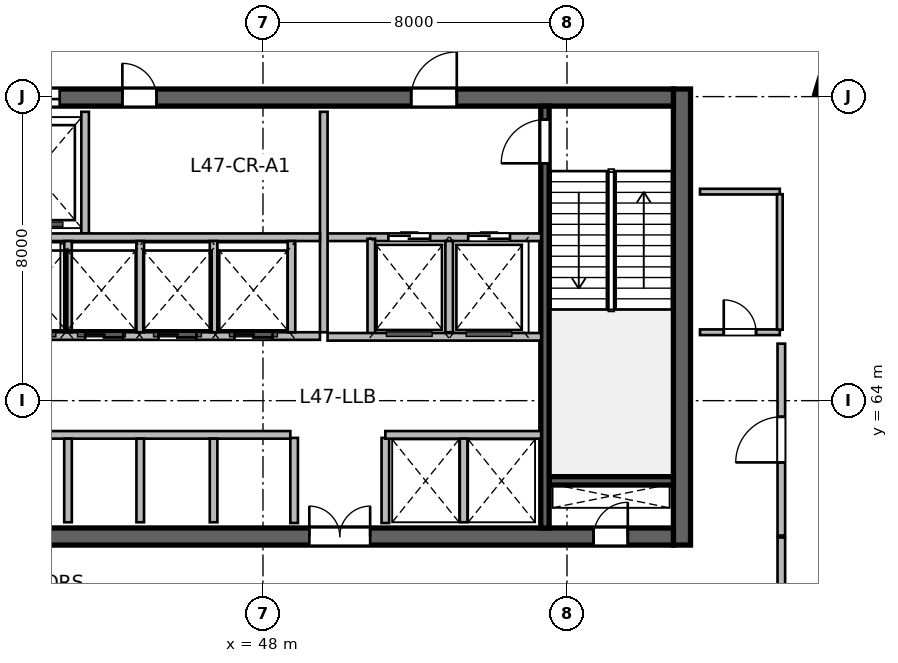
"""IFC4 building model, lengths in metres.
Left out: names, types, materials, properties, quantities, classifications, styles, units other than length and angle.
Written with IfcOpenShell. Run it as: python <this file> out.ifc"""

import sys

from ifc_helpers import new_model, si_unit, direction, frame, frame_2d, origin, origin_2d, place, context, subcontext, project, spatial, rectangle, extrude, source, transform, mapped, element, fill, save


model = new_model("IFC4")
c1 = context("Model", 3, precision=1e-05, world=origin(), true_north=direction((0.0, 1.0)))
c2 = subcontext(c1, "Body", "Model", "MODEL_VIEW")
j1 = project(units=[si_unit("LENGTHUNIT", "METRE"), si_unit("PLANEANGLEUNIT", "RADIAN")], contexts=[c1])
p1 = place(None, origin())
s1 = spatial("IfcSite", under=j1, at=p1, CompositionType="ELEMENT")
p2 = place(p1, origin())
s2 = spatial("IfcBuilding", under=s1, at=p2, CompositionType="ELEMENT")
p3 = place(p2, frame((0.0, 0.0, 194.4)))
s3 = spatial("IfcBuildingStorey", under=s2, at=p3, CompositionType="ELEMENT", Elevation=194.4)
m1 = source(origin(), c2, "Body", "SweptSolid", [
    extrude(rectangle(XDim=12.0, YDim=0.45, at=frame_2d((6.0, 0.0))), origin(), (0.0, 0.0, 1.0), 4.8),
])
p4 = place(p3, frame((59.025, 60.2, 0.0), z_axis=(0.0, 0.0, 1.0), x_axis=(0.0, 1.0, 0.0)))
e1 = element("IfcWall", 1, at=p4, inside=s3, PredefinedType="SHEAR", context=c2, shape_type="MappedRepresentation", body=[
    mapped(m1, transform((0.0, 0.0, 0.0), scale=1.0)),
])
m2 = source(origin(), c2, "Body", "SweptSolid", [
    extrude(rectangle(XDim=21.6, YDim=0.45, at=frame_2d((10.8, 0.0))), origin(), (0.0, 0.0, 1.0), 4.8),
])
p5 = place(p3, frame((37.2, 60.425, 0.0), z_axis=(0.0, 0.0, 1.0), x_axis=(1.0, 0.0, 0.0)))
e2 = element("IfcWall", 2, at=p5, inside=s3, PredefinedType="SHEAR", context=c2, shape_type="MappedRepresentation", body=[
    mapped(m2, transform((0.0, 0.0, 0.0), scale=1.0)),
])
p6 = place(p5, frame((1.1, 0.0, 0.0)))
e3 = element("IfcOpeningElement", 3, at=p6, cuts=e2, PredefinedType="OPENING", context=c2, shape_type="SweptSolid", body=[
    extrude(rectangle(XDim=1.15, YDim=2.15, at=frame_2d((0.575, 1.075))), frame((0.0, 0.235, 0.0), z_axis=(0.0, -1.0, 0.0), x_axis=(1.0, 0.0, 0.0)), (0.0, 0.0, 1.0), 0.47),
])
p7 = place(p5, frame((19.5, 0.0, 0.0)))
e4 = element("IfcOpeningElement", 4, at=p7, cuts=e2, PredefinedType="OPENING", context=c2, shape_type="SweptSolid", body=[
    extrude(rectangle(XDim=0.9, YDim=2.1, at=frame_2d((0.45, 1.05))), frame((0.0, 0.235, 0.0), z_axis=(0.0, -1.0, 0.0), x_axis=(1.0, 0.0, 0.0)), (0.0, 0.0, 1.0), 0.47),
])
p8 = place(p5, frame((12.02, 0.0, 0.0)))
e5 = element("IfcOpeningElement", 5, at=p8, cuts=e2, PredefinedType="OPENING", context=c2, shape_type="SweptSolid", body=[
    extrude(rectangle(XDim=1.6, YDim=2.15, at=frame_2d((0.8, 1.075))), frame((0.0, 0.235, 0.0), z_axis=(0.0, -1.0, 0.0), x_axis=(1.0, 0.0, 0.0)), (0.0, 0.0, 1.0), 0.47),
])
p9 = place(p3, frame((37.2, 71.975, 0.0), z_axis=(0.0, 0.0, 1.0), x_axis=(1.0, 0.0, 0.0)))
e6 = element("IfcWall", 6, at=p9, inside=s3, PredefinedType="SHEAR", context=c2, shape_type="MappedRepresentation", body=[
    mapped(m2, transform((0.0, 0.0, 0.0), scale=1.0)),
])
p10 = place(p9, frame((1.2, 0.0, 0.0)))
e7 = element("IfcOpeningElement", 7, at=p10, cuts=e6, PredefinedType="OPENING", context=c2, shape_type="SweptSolid", body=[
    extrude(rectangle(XDim=0.9, YDim=2.1, at=frame_2d((0.45, 1.05))), frame((0.0, 0.235, 0.0), z_axis=(0.0, -1.0, 0.0), x_axis=(1.0, 0.0, 0.0)), (0.0, 0.0, 1.0), 0.47),
])
p11 = place(p9, frame((14.7, 0.0, 0.0)))
e8 = element("IfcOpeningElement", 8, at=p11, cuts=e6, PredefinedType="OPENING", context=c2, shape_type="SweptSolid", body=[
    extrude(rectangle(XDim=1.2, YDim=2.15, at=frame_2d((0.6, 1.075))), frame((0.0, 0.235, 0.0), z_axis=(0.0, -1.0, 0.0), x_axis=(1.0, 0.0, 0.0)), (0.0, 0.0, 1.0), 0.47),
])
p12 = place(p9, frame((4.15, 0.0, 0.0)))
e9 = element("IfcOpeningElement", 9, at=p12, cuts=e6, PredefinedType="OPENING", context=c2, shape_type="SweptSolid", body=[
    extrude(rectangle(XDim=1.3, YDim=2.15, at=frame_2d((0.65, 1.075))), frame((0.0, 0.235, 0.0), z_axis=(0.0, -1.0, 0.0), x_axis=(1.0, 0.0, 0.0)), (0.0, 0.0, 1.0), 0.47),
])
p13 = place(p9, frame((7.1, 0.0, 0.0)))
e10 = element("IfcOpeningElement", 10, at=p13, cuts=e6, PredefinedType="OPENING", context=c2, shape_type="SweptSolid", body=[
    extrude(rectangle(XDim=0.9, YDim=2.1, at=frame_2d((0.45, 1.05))), frame((0.0, 0.235, 0.0), z_axis=(0.0, -1.0, 0.0), x_axis=(1.0, 0.0, 0.0)), (0.0, 0.0, 1.0), 0.47),
])
m3 = source(origin(), c2, "Body", "SweptSolid", [
    extrude(rectangle(XDim=3.27, YDim=0.22, at=frame_2d((1.635, 0.0))), origin(), (0.0, 0.0, 1.0), 4.8),
])
p14 = place(p3, frame((55.53, 61.89, 0.0), z_axis=(0.0, 0.0, 1.0), x_axis=(1.0, 0.0, 0.0)))
e11 = element("IfcWall", 11, at=p14, inside=s3, PredefinedType="SHEAR", context=c2, shape_type="MappedRepresentation", body=[
    mapped(m3, transform((0.0, 0.0, 0.0), scale=1.0)),
])
m4 = source(origin(), c2, "Body", "SweptSolid", [
    extrude(rectangle(XDim=11.1, YDim=0.22, at=frame_2d((5.55, 0.0))), origin(), (0.0, 0.0, 1.0), 4.8),
])
p15 = place(p3, frame((55.42, 60.65, 0.0), z_axis=(0.0, 0.0, 1.0), x_axis=(0.0, 1.0, 0.0)))
e12 = element("IfcWall", 12, at=p15, inside=s3, PredefinedType="SHEAR", context=c2, shape_type="MappedRepresentation", body=[
    mapped(m4, transform((0.0, 0.0, 0.0), scale=1.0)),
])
p16 = place(p15, frame((9.595, 0.0, 0.0)))
e13 = element("IfcOpeningElement", 13, at=p16, cuts=e12, PredefinedType="OPENING", context=c2, shape_type="SweptSolid", body=[
    extrude(rectangle(XDim=1.15, YDim=2.15, at=frame_2d((0.575, 1.075))), frame((0.0, 0.12, 0.0), z_axis=(0.0, -1.0, 0.0), x_axis=(1.0, 0.0, 0.0)), (0.0, 0.0, 1.0), 0.24),
])
m5 = source(origin(), c2, "Body", "SweptSolid", [
    extrude(rectangle(XDim=1.1, YDim=1.1, at=origin_2d()), origin(), (0.0, 0.0, 1.0), 4.8),
])
p17 = place(p3, frame((63.209, 72.442, 0.0), z_axis=(0.0, 0.0, 1.0), x_axis=(0.288697611798, 0.957420330337, 0.0)))
e14 = element("IfcColumn", 14, at=p17, inside=s3, PredefinedType="COLUMN", context=c2, shape_type="MappedRepresentation", body=[
    mapped(m5, transform((0.0, 0.0, 0.0), scale=1.0)),
])
m6 = source(origin(), c2, "Body", "SweptSolid", [
    extrude(rectangle(XDim=2.24, YDim=0.2, at=frame_2d((1.12, 0.0))), origin(), (0.0, 0.0, 1.0), 4.54),
])
for number, where, z_axis, x_axis in (
    (15, (48.82, 60.78, 0.0), (0.0, 0.0, 1.0), (0.0, 1.0, 0.0)),
    (16, (51.22, 60.78, 0.0), (0.0, 0.0, 1.0), (0.0, 1.0, 0.0)),
):
    element("IfcWall", number, at=place(p3, frame(where, z_axis=z_axis, x_axis=x_axis)), inside=s3, PredefinedType="SOLIDWALL", context=c2, shape_type="MappedRepresentation", body=[
        mapped(m6, transform((0.0, 0.0, 0.0), scale=1.0)),
    ])
m7 = source(origin(), c2, "Body", "SweptSolid", [
    extrude(rectangle(XDim=5.62, YDim=0.2, at=frame_2d((2.81, 0.0))), origin(), (0.0, 0.0, 1.0), 4.54),
])
p18 = place(p3, frame((49.7, 68.3, 0.0), z_axis=(0.0, 0.0, 1.0), x_axis=(1.0, 0.0, 0.0)))
e17 = element("IfcWall", 17, at=p18, inside=s3, PredefinedType="SOLIDWALL", context=c2, shape_type="MappedRepresentation", body=[
    mapped(m7, transform((0.0, 0.0, 0.0), scale=1.0)),
])
p19 = place(p18, frame((1.6, 0.0, 0.0)))
e18 = element("IfcOpeningElement", 18, at=p19, cuts=e17, PredefinedType="OPENING", context=c2, shape_type="SweptSolid", body=[
    extrude(rectangle(XDim=1.1, YDim=2.15, at=frame_2d((0.55, 1.075))), frame((0.0, 0.11, 0.0), z_axis=(0.0, -1.0, 0.0), x_axis=(1.0, 0.0, 0.0)), (0.0, 0.0, 1.0), 0.22),
])
p20 = place(p18, frame((3.7, 0.0, 0.0)))
e19 = element("IfcOpeningElement", 19, at=p20, cuts=e17, PredefinedType="OPENING", context=c2, shape_type="SweptSolid", body=[
    extrude(rectangle(XDim=1.1, YDim=2.15, at=frame_2d((0.55, 1.075))), frame((0.0, 0.11, 0.0), z_axis=(0.0, -1.0, 0.0), x_axis=(1.0, 0.0, 0.0)), (0.0, 0.0, 1.0), 0.22),
])
m8 = source(origin(), c2, "Body", "SweptSolid", [
    extrude(rectangle(XDim=5.8, YDim=0.2, at=frame_2d((2.9, 0.0))), origin(), (0.0, 0.0, 1.0), 4.54),
])
p21 = place(p3, frame((49.6, 65.8, 0.0), z_axis=(0.0, 0.0, 1.0), x_axis=(0.0, 1.0, 0.0)))
e20 = element("IfcWall", 20, at=p21, inside=s3, PredefinedType="SOLIDWALL", context=c2, shape_type="MappedRepresentation", body=[
    mapped(m8, transform((0.0, 0.0, 0.0), scale=1.0)),
])
m9 = source(origin(), c2, "Body", "SweptSolid", [
    extrude(rectangle(XDim=2.58, YDim=0.2, at=frame_2d((1.29, 0.0))), origin(), (0.0, 0.0, 1.0), 4.54),
])
p22 = place(p3, frame((50.85, 65.68, 0.0), z_axis=(0.0, 0.0, 1.0), x_axis=(0.0, 1.0, 0.0)))
e21 = element("IfcWall", 21, at=p22, inside=s3, PredefinedType="SOLIDWALL", context=c2, shape_type="MappedRepresentation", body=[
    mapped(m9, transform((0.0, 0.0, 0.0), scale=1.0)),
])
m10 = source(origin(), c2, "Body", "SweptSolid", [
    extrude(rectangle(XDim=2.4, YDim=0.2, at=frame_2d((1.2, 0.0))), origin(), (0.0, 0.0, 1.0), 4.54),
])
p23 = place(p3, frame((52.9, 65.8, 0.0), z_axis=(0.0, 0.0, 1.0), x_axis=(0.0, 1.0, 0.0)))
e22 = element("IfcWall", 22, at=p23, inside=s3, PredefinedType="SOLIDWALL", context=c2, shape_type="MappedRepresentation", body=[
    mapped(m10, transform((0.0, 0.0, 0.0), scale=1.0)),
])
p24 = place(p3, frame((49.7, 65.68, 0.0), z_axis=(0.0, 0.0, 1.0), x_axis=(1.0, 0.0, 0.0)))
e23 = element("IfcWall", 23, at=p24, inside=s3, PredefinedType="SOLIDWALL", context=c2, shape_type="MappedRepresentation", body=[
    mapped(m7, transform((0.0, 0.0, 0.0), scale=1.0)),
])
m11 = source(origin(), c2, "Body", "SweptSolid", [
    extrude(rectangle(XDim=3.2, YDim=0.2, at=frame_2d((1.6, 0.0))), origin(), (0.0, 0.0, 1.0), 4.54),
])
p25 = place(p3, frame((43.32, 68.4, 0.0), z_axis=(0.0, 0.0, 1.0), x_axis=(0.0, 1.0, 0.0)))
e24 = element("IfcWall", 24, at=p25, inside=s3, PredefinedType="SOLIDWALL", context=c2, shape_type="MappedRepresentation", body=[
    mapped(m11, transform((0.0, 0.0, 0.0), scale=1.0)),
])
m12 = source(origin(), c2, "Body", "SweptSolid", [
    extrude(rectangle(XDim=8.8, YDim=0.2, at=frame_2d((4.4, 0.0))), origin(), (0.0, 0.0, 1.0), 4.54),
])
p26 = place(p3, frame((40.7, 68.3, 0.0), z_axis=(0.0, 0.0, 1.0), x_axis=(1.0, 0.0, 0.0)))
e25 = element("IfcWall", 25, at=p26, inside=s3, PredefinedType="SOLIDWALL", context=c2, shape_type="MappedRepresentation", body=[
    mapped(m12, transform((0.0, 0.0, 0.0), scale=1.0)),
])
m13 = source(origin(), c2, "Body", "SweptSolid", [
    extrude(rectangle(XDim=8.02, YDim=0.2, at=frame_2d((4.01, 0.0))), origin(), (0.0, 0.0, 1.0), 4.54),
])
p27 = place(p3, frame((40.7, 63.1, 0.0), z_axis=(0.0, 0.0, 1.0), x_axis=(1.0, 0.0, 0.0)))
e26 = element("IfcWall", 26, at=p27, inside=s3, PredefinedType="SOLIDWALL", context=c2, shape_type="MappedRepresentation", body=[
    mapped(m13, transform((0.0, 0.0, 0.0), scale=1.0)),
])
m14 = source(origin(), c2, "Body", "SweptSolid", [
    extrude(rectangle(XDim=4.1, YDim=0.2, at=frame_2d((2.05, 0.0))), origin(), (0.0, 0.0, 1.0), 4.54),
])
p28 = place(p3, frame((51.22, 63.1, 0.0), z_axis=(0.0, 0.0, 1.0), x_axis=(1.0, 0.0, 0.0)))
e27 = element("IfcWall", 27, at=p28, inside=s3, PredefinedType="SOLIDWALL", context=c2, shape_type="MappedRepresentation", body=[
    mapped(m14, transform((0.0, 0.0, 0.0), scale=1.0)),
])
m15 = source(origin(), c2, "Body", "SweptSolid", [
    extrude(rectangle(XDim=2.2, YDim=0.2, at=frame_2d((1.1, 0.0))), origin(), (0.0, 0.0, 1.0), 4.54),
])
for number, where, z_axis, x_axis in (
    (28, (42.87, 60.8, 0.0), (0.0, 0.0, 1.0), (0.0, 1.0, 0.0)),
    (29, (44.77, 60.8, 0.0), (0.0, 0.0, 1.0), (0.0, 1.0, 0.0)),
    (30, (46.7, 60.8, 0.0), (0.0, 0.0, 1.0), (0.0, 1.0, 0.0)),
    (31, (53.28, 60.8, 0.0), (0.0, 0.0, 1.0), (0.0, 1.0, 0.0)),
):
    element("IfcWall", number, at=place(p3, frame(where, z_axis=z_axis, x_axis=x_axis)), inside=s3, PredefinedType="SOLIDWALL", context=c2, shape_type="MappedRepresentation", body=[
        mapped(m15, transform((0.0, 0.0, 0.0), scale=1.0)),
    ])
p29 = place(p3, frame((40.7, 65.7, 0.0), z_axis=(0.0, 0.0, 1.0), x_axis=(1.0, 0.0, 0.0)))
e32 = element("IfcWall", 32, at=p29, inside=s3, PredefinedType="SOLIDWALL", context=c2, shape_type="MappedRepresentation", body=[
    mapped(m12, transform((0.0, 0.0, 0.0), scale=1.0)),
])
p30 = place(p29, frame((0.72, 0.0, 0.0)))
e33 = element("IfcOpeningElement", 33, at=p30, cuts=e32, PredefinedType="OPENING", context=c2, shape_type="SweptSolid", body=[
    extrude(rectangle(XDim=1.0, YDim=2.15, at=frame_2d((0.5, 1.075))), frame((0.0, 0.11, 0.0), z_axis=(0.0, -1.0, 0.0), x_axis=(1.0, 0.0, 0.0)), (0.0, 0.0, 1.0), 0.22),
])
p31 = place(p29, frame((2.62, 0.0, 0.0)))
e34 = element("IfcOpeningElement", 34, at=p31, cuts=e32, PredefinedType="OPENING", context=c2, shape_type="SweptSolid", body=[
    extrude(rectangle(XDim=1.0, YDim=2.15, at=frame_2d((0.5, 1.075))), frame((0.0, 0.11, 0.0), z_axis=(0.0, -1.0, 0.0), x_axis=(1.0, 0.0, 0.0)), (0.0, 0.0, 1.0), 0.22),
])
p32 = place(p29, frame((4.55, 0.0, 0.0)))
e35 = element("IfcOpeningElement", 35, at=p32, cuts=e32, PredefinedType="OPENING", context=c2, shape_type="SweptSolid", body=[
    extrude(rectangle(XDim=1.0, YDim=2.15, at=frame_2d((0.5, 1.075))), frame((0.0, 0.11, 0.0), z_axis=(0.0, -1.0, 0.0), x_axis=(1.0, 0.0, 0.0)), (0.0, 0.0, 1.0), 0.22),
])
p33 = place(p29, frame((6.55, 0.0, 0.0)))
e36 = element("IfcOpeningElement", 36, at=p33, cuts=e32, PredefinedType="OPENING", context=c2, shape_type="SweptSolid", body=[
    extrude(rectangle(XDim=1.0, YDim=2.15, at=frame_2d((0.5, 1.075))), frame((0.0, 0.11, 0.0), z_axis=(0.0, -1.0, 0.0), x_axis=(1.0, 0.0, 0.0)), (0.0, 0.0, 1.0), 0.22),
])
for number, where, z_axis, x_axis in (
    (37, (48.75, 65.8, 0.0), (0.0, 0.0, 1.0), (0.0, 1.0, 0.0)),
    (38, (42.87, 65.8, 0.0), (0.0, 0.0, 1.0), (0.0, 1.0, 0.0)),
    (39, (44.77, 65.8, 0.0), (0.0, 0.0, 1.0), (0.0, 1.0, 0.0)),
    (40, (46.7, 65.8, 0.0), (0.0, 0.0, 1.0), (0.0, 1.0, 0.0)),
):
    element("IfcWall", number, at=place(p3, frame(where, z_axis=z_axis, x_axis=x_axis)), inside=s3, PredefinedType="SOLIDWALL", context=c2, shape_type="MappedRepresentation", body=[
        mapped(m10, transform((0.0, 0.0, 0.0), scale=1.0)),
    ])
m16 = source(origin(), c2, "Body", "SweptSolid", [
    extrude(rectangle(XDim=2.1, YDim=0.15, at=frame_2d((1.05, 0.0))), origin(), (0.0, 0.0, 1.0), 4.54),
])
p34 = place(p3, frame((59.5, 65.8, 0.0), z_axis=(0.0, 0.0, 1.0), x_axis=(1.0, 0.0, 0.0)))
e41 = element("IfcWall", 41, at=p34, inside=s3, PredefinedType="PARTITIONING", context=c2, shape_type="MappedRepresentation", body=[
    mapped(m16, transform((0.0, 0.0, 0.0), scale=1.0)),
])
p35 = place(p34, frame((0.625, 0.0, 0.0)))
e42 = element("IfcOpeningElement", 42, at=p35, cuts=e41, PredefinedType="OPENING", context=c2, shape_type="SweptSolid", body=[
    extrude(rectangle(XDim=0.85, YDim=2.1, at=frame_2d((0.425, 1.05))), frame((0.0, 0.085, 0.0), z_axis=(0.0, -1.0, 0.0), x_axis=(1.0, 0.0, 0.0)), (0.0, 0.0, 1.0), 0.17),
])
p36 = place(p3, frame((59.5, 69.5, 0.0), z_axis=(0.0, 0.0, 1.0), x_axis=(1.0, 0.0, 0.0)))
e43 = element("IfcWall", 43, at=p36, inside=s3, PredefinedType="PARTITIONING", context=c2, shape_type="MappedRepresentation", body=[
    mapped(m16, transform((0.0, 0.0, 0.0), scale=1.0)),
])
m17 = source(origin(), c2, "Body", "SweptSolid", [
    extrude(rectangle(XDim=3.565, YDim=0.15, at=frame_2d((1.783, 0.0))), origin(), (0.0, 0.0, 1.0), 4.54),
])
p37 = place(p3, frame((61.6, 65.867, 0.0), z_axis=(0.0, 0.0, 1.0), x_axis=(0.0, 1.0, 0.0)))
e44 = element("IfcWall", 44, at=p37, inside=s3, PredefinedType="PARTITIONING", context=c2, shape_type="MappedRepresentation", body=[
    mapped(m17, transform((0.0, 0.0, 0.0), scale=1.0)),
])
m18 = source(origin(), c2, "Body", "SweptSolid", [
    extrude(rectangle(XDim=12.336, YDim=0.2, at=frame_2d((6.168, 0.0))), origin(), (0.0, 0.0, 1.0), 3.898),
])
p38 = place(p3, frame((61.64, 48.064, 0.0), z_axis=(0.0, 0.0, 1.0), x_axis=(0.0, 1.0, 0.0)))
e45 = element("IfcWall", 45, at=p38, inside=s3, PredefinedType="SOLIDWALL", context=c2, shape_type="MappedRepresentation", body=[
    mapped(m18, transform((0.0, 0.0, 0.0), scale=1.0)),
])
m19 = source(origin(), c2, "Body", "SweptSolid", [
    extrude(rectangle(XDim=5.05, YDim=0.2, at=frame_2d((2.525, 0.0))), origin(), (0.0, 0.0, 1.0), 4.54),
])
p39 = place(p3, frame((61.64, 60.45, 0.0), z_axis=(0.0, 0.0, 1.0), x_axis=(0.0, 1.0, 0.0)))
e46 = element("IfcWall", 46, at=p39, inside=s3, PredefinedType="SOLIDWALL", context=c2, shape_type="MappedRepresentation", body=[
    mapped(m19, transform((0.0, 0.0, 0.0), scale=1.0)),
])
p40 = place(p39, frame((1.925, 0.0, 0.0)))
e47 = element("IfcOpeningElement", 47, at=p40, cuts=e46, PredefinedType="OPENING", context=c2, shape_type="SweptSolid", body=[
    extrude(rectangle(XDim=1.2, YDim=2.15, at=frame_2d((0.6, 1.075))), frame((0.0, 0.11, 0.0), z_axis=(0.0, -1.0, 0.0), x_axis=(1.0, 0.0, 0.0)), (0.0, 0.0, 1.0), 0.22),
])
m20 = source(origin(), c2, "Body", "SweptSolid", [
    extrude(rectangle(XDim=0.9, YDim=2.1, at=frame_2d((0.45, 1.05))), frame((0.0, 0.025, 0.0), z_axis=(0.0, -1.0, 0.0), x_axis=(1.0, 0.0, 0.0)), (0.0, 0.0, 1.0), 0.05),
])
p41 = place(p7, origin())
e48 = element("IfcDoor", 48, at=p41, inside=s3, OperationType="SINGLE_SWING_RIGHT", PredefinedType="DOOR", context=c2, shape_type="MappedRepresentation", body=[
    mapped(m20, transform((0.0, 0.0, 0.0), scale=1.0)),
])
fill(e4, e48)
m21 = source(origin(), c2, "Body", "SweptSolid", [
    extrude(rectangle(XDim=1.15, YDim=2.15, at=frame_2d((0.575, 1.075))), frame((0.0, 0.025, 0.0), z_axis=(0.0, -1.0, 0.0), x_axis=(1.0, 0.0, 0.0)), (0.0, 0.0, 1.0), 0.05),
])
p42 = place(p16, origin())
e49 = element("IfcDoor", 49, at=p42, inside=s3, OperationType="SINGLE_SWING_LEFT", PredefinedType="DOOR", context=c2, shape_type="MappedRepresentation", body=[
    mapped(m21, transform((0.0, 0.0, 0.0), scale=1.0)),
])
fill(e13, e49)
m22 = source(origin(), c2, "Body", "SweptSolid", [
    extrude(rectangle(XDim=1.6, YDim=2.15, at=frame_2d((0.8, 1.075))), frame((0.0, 0.025, 0.0), z_axis=(0.0, -1.0, 0.0), x_axis=(1.0, 0.0, 0.0)), (0.0, 0.0, 1.0), 0.05),
])
p43 = place(p8, origin())
e50 = element("IfcDoor", 50, at=p43, inside=s3, OperationType="DOUBLE_DOOR_SINGLE_SWING", PredefinedType="DOOR", context=c2, shape_type="MappedRepresentation", body=[
    mapped(m22, transform((0.0, 0.0, 0.0), scale=1.0)),
])
fill(e5, e50)
m23 = source(origin(), c2, "Body", "SweptSolid", [
    extrude(rectangle(XDim=1.2, YDim=2.15, at=frame_2d((0.6, 1.075))), frame((0.0, 0.025, 0.0), z_axis=(0.0, -1.0, 0.0), x_axis=(1.0, 0.0, 0.0)), (0.0, 0.0, 1.0), 0.05),
])
p44 = place(p11, origin())
e51 = element("IfcDoor", 51, at=p44, inside=s3, OperationType="SINGLE_SWING_RIGHT", PredefinedType="DOOR", context=c2, shape_type="MappedRepresentation", body=[
    mapped(m23, transform((0.0, 0.0, 0.0), scale=1.0)),
])
fill(e8, e51)
m24 = source(origin(), c2, "Body", "SweptSolid", [
    extrude(rectangle(XDim=1.1, YDim=2.15, at=frame_2d((0.55, 1.075))), frame((0.0, 0.025, 0.0), z_axis=(0.0, -1.0, 0.0), x_axis=(1.0, 0.0, 0.0)), (0.0, 0.0, 1.0), 0.05),
])
p45 = place(p19, origin())
e52 = element("IfcDoor", 52, at=p45, inside=s3, OperationType="DOUBLE_DOOR_SLIDING", PredefinedType="DOOR", context=c2, shape_type="MappedRepresentation", body=[
    mapped(m24, transform((0.0, 0.0, 0.0), scale=1.0)),
])
fill(e18, e52)
p46 = place(p20, origin())
e53 = element("IfcDoor", 53, at=p46, inside=s3, OperationType="DOUBLE_DOOR_SLIDING", PredefinedType="DOOR", context=c2, shape_type="MappedRepresentation", body=[
    mapped(m24, transform((0.0, 0.0, 0.0), scale=1.0)),
])
fill(e19, e53)
m25 = source(origin(), c2, "Body", "SweptSolid", [
    extrude(rectangle(XDim=1.3, YDim=2.15, at=frame_2d((0.65, 1.075))), frame((0.0, 0.025, 0.0), z_axis=(0.0, -1.0, 0.0), x_axis=(1.0, 0.0, 0.0)), (0.0, 0.0, 1.0), 0.05),
])
p47 = place(p12, origin())
e54 = element("IfcDoor", 54, at=p47, inside=s3, OperationType="DOUBLE_DOOR_SLIDING", PredefinedType="DOOR", context=c2, shape_type="MappedRepresentation", body=[
    mapped(m25, transform((0.0, 0.0, 0.0), scale=1.0)),
])
fill(e9, e54)
p48 = place(p13, origin())
e55 = element("IfcDoor", 55, at=p48, inside=s3, OperationType="SINGLE_SWING_LEFT", PredefinedType="DOOR", context=c2, shape_type="MappedRepresentation", body=[
    mapped(m20, transform((0.0, 0.0, 0.0), scale=1.0)),
])
fill(e10, e55)
m26 = source(origin(), c2, "Body", "SweptSolid", [
    extrude(rectangle(XDim=1.0, YDim=2.15, at=frame_2d((0.5, 1.075))), frame((0.0, 0.025, 0.0), z_axis=(0.0, -1.0, 0.0), x_axis=(1.0, 0.0, 0.0)), (0.0, 0.0, 1.0), 0.05),
])
p49 = place(p31, origin())
e56 = element("IfcDoor", 56, at=p49, inside=s3, OperationType="DOUBLE_DOOR_SLIDING", PredefinedType="DOOR", context=c2, shape_type="MappedRepresentation", body=[
    mapped(m26, transform((0.0, 0.0, 0.0), scale=1.0)),
])
fill(e34, e56)
p50 = place(p32, origin())
e57 = element("IfcDoor", 57, at=p50, inside=s3, OperationType="DOUBLE_DOOR_SLIDING", PredefinedType="DOOR", context=c2, shape_type="MappedRepresentation", body=[
    mapped(m26, transform((0.0, 0.0, 0.0), scale=1.0)),
])
fill(e35, e57)
p51 = place(p33, origin())
e58 = element("IfcDoor", 58, at=p51, inside=s3, OperationType="DOUBLE_DOOR_SLIDING", PredefinedType="DOOR", context=c2, shape_type="MappedRepresentation", body=[
    mapped(m26, transform((0.0, 0.0, 0.0), scale=1.0)),
])
fill(e36, e58)
m27 = source(origin(), c2, "Body", "SweptSolid", [
    extrude(rectangle(XDim=0.85, YDim=2.1, at=frame_2d((0.425, 1.05))), frame((0.0, 0.025, 0.0), z_axis=(0.0, -1.0, 0.0), x_axis=(1.0, 0.0, 0.0)), (0.0, 0.0, 1.0), 0.05),
])
p52 = place(p35, origin())
e59 = element("IfcDoor", 59, at=p52, inside=s3, OperationType="SINGLE_SWING_LEFT", PredefinedType="DOOR", context=c2, shape_type="MappedRepresentation", body=[
    mapped(m27, transform((0.0, 0.0, 0.0), scale=1.0)),
])
fill(e42, e59)
p53 = place(p40, origin())
e60 = element("IfcDoor", 60, at=p53, inside=s3, OperationType="SINGLE_SWING_LEFT", PredefinedType="DOOR", context=c2, shape_type="MappedRepresentation", body=[
    mapped(m23, transform((0.0, 0.0, 0.0), scale=1.0)),
])
fill(e47, e60)
save(model, sys.argv[1])
